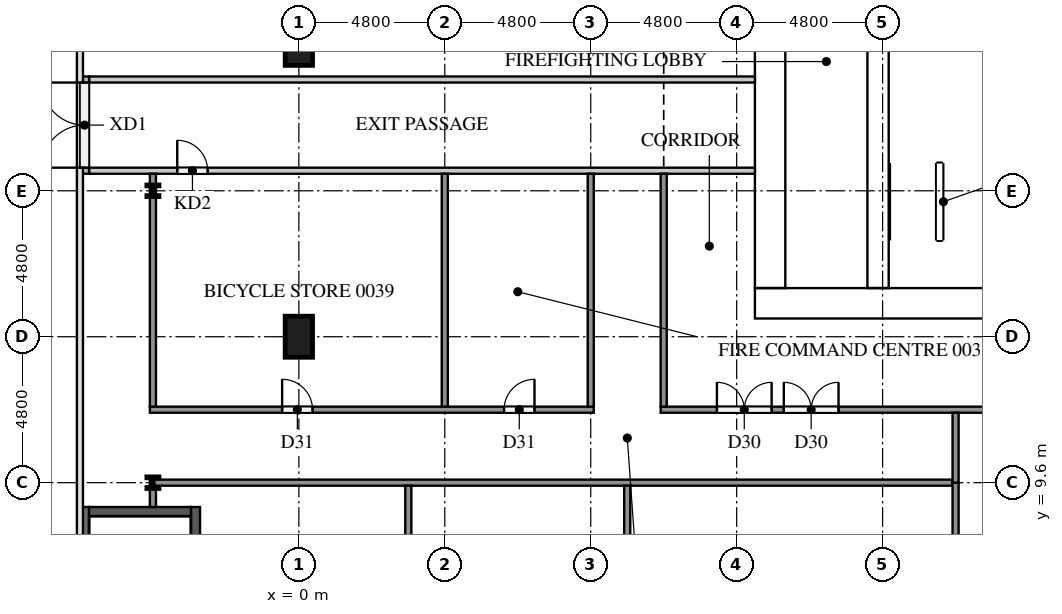
"""IFC4 building model, lengths in metres.
Left out: names, types, materials, properties, quantities, classifications, styles, units other than length and angle.
Written with IfcOpenShell. Run it as: python <this file> out.ifc"""

import sys

from ifc_helpers import new_model, si_unit, direction, frame, frame_2d, origin, origin_2d, place, context, subcontext, project, spatial, rectangle, i_section, extrude, element, fill, save


model = new_model("IFC4")
c1 = context("Model", 3, precision=1e-05, world=origin(), true_north=direction((0.0, 1.0)))
c2 = subcontext(c1, "Body", "Model", "MODEL_VIEW")
j1 = project(units=[si_unit("LENGTHUNIT", "METRE"), si_unit("PLANEANGLEUNIT", "RADIAN")], contexts=[c1])
p1 = place(None, origin())
s1 = spatial("IfcSite", under=j1, at=p1, CompositionType="ELEMENT")
p2 = place(p1, origin())
s2 = spatial("IfcBuilding", under=s1, at=p2, CompositionType="ELEMENT")
p3 = place(p2, origin())
s3 = spatial("IfcBuildingStorey", under=s2, at=p3, CompositionType="ELEMENT", Elevation=0.0)
p4 = place(p3, frame((-7.05, 0.8, 0.0), z_axis=(0.0, 0.0, 1.0), x_axis=(0.0, 1.0, 0.0)))
e1 = element("IfcWall", 1, at=p4, inside=s3, PredefinedType="SOLIDWALL", context=c2, shape_type="SweptSolid", body=[
    extrude(rectangle(XDim=8.0, YDim=0.3, at=frame_2d((4.0, 0.0))), origin(), (0.0, 0.0, 1.0), 5.7),
])
p5 = place(p4, frame((0.4, 0.0, 0.0)))
e2 = element("IfcOpeningElement", 2, at=p5, cuts=e1, PredefinedType="OPENING", context=c2, shape_type="SweptSolid", body=[
    extrude(rectangle(XDim=1.4, YDim=2.1, at=frame_2d((0.7, 1.05))), frame((0.0, 0.16, 0.0), z_axis=(0.0, -1.0, 0.0), x_axis=(1.0, 0.0, 0.0)), (0.0, 0.0, 1.0), 0.32),
])
p6 = place(p3, frame((-3.4, 0.8, 0.0), z_axis=(0.0, 0.0, 1.0), x_axis=(0.0, 1.0, 0.0)))
e3 = element("IfcWall", 3, at=p6, inside=s3, PredefinedType="SOLIDWALL", context=c2, shape_type="SweptSolid", body=[
    extrude(rectangle(XDim=8.0, YDim=0.3, at=frame_2d((4.0, 0.0))), origin(), (0.0, 0.0, 1.0), 5.7),
])
p7 = place(p3, frame((-6.9, 8.65, 0.0), z_axis=(0.0, 0.0, 1.0), x_axis=(1.0, 0.0, 0.0)))
e4 = element("IfcWall", 4, at=p7, inside=s3, PredefinedType="SOLIDWALL", context=c2, shape_type="SweptSolid", body=[
    extrude(rectangle(XDim=3.35, YDim=0.3, at=frame_2d((1.675, 0.0))), origin(), (0.0, 0.0, 1.0), 5.7),
])
p8 = place(p3, frame((15.0, 15.5, 0.0), z_axis=(0.0, 0.0, 1.0), x_axis=(1.0, 0.0, 0.0)))
e5 = element("IfcWall", 5, at=p8, inside=s3, PredefinedType="SHEAR", context=c2, shape_type="SweptSolid", body=[
    extrude(rectangle(XDim=32.4, YDim=1.0, at=frame_2d((16.2, 0.0))), origin(), (0.0, 0.0, 1.0), 5.7),
])
p9 = place(p8, frame((15.3, 0.0, 0.0)))
e6 = element("IfcOpeningElement", 6, at=p9, cuts=e5, PredefinedType="OPENING", context=c2, shape_type="SweptSolid", body=[
    extrude(rectangle(XDim=1.8, YDim=2.1, at=frame_2d((0.9, 1.05))), frame((0.0, 0.51, 0.0), z_axis=(0.0, -1.0, 0.0), x_axis=(1.0, 0.0, 0.0)), (0.0, 0.0, 1.0), 1.02),
])
p10 = place(p3, frame((15.5, 16.0, 0.0), z_axis=(0.0, 0.0, 1.0), x_axis=(0.0, 1.0, 0.0)))
e7 = element("IfcWall", 7, at=p10, inside=s3, PredefinedType="SHEAR", context=c2, shape_type="SweptSolid", body=[
    extrude(rectangle(XDim=20.8, YDim=1.0, at=frame_2d((10.4, 0.0))), origin(), (0.0, 0.0, 1.0), 5.7),
])
p11 = place(p10, frame((4.76, 0.0, 0.0)))
e8 = element("IfcOpeningElement", 8, at=p11, cuts=e7, PredefinedType="OPENING", context=c2, shape_type="SweptSolid", body=[
    extrude(rectangle(XDim=1.2, YDim=2.1, at=frame_2d((0.6, 1.05))), frame((0.0, 0.51, 0.0), z_axis=(0.0, -1.0, 0.0), x_axis=(1.0, 0.0, 0.0)), (0.0, 0.0, 1.0), 1.02),
])
p12 = place(p3, frame((19.05, 16.0, 0.0), z_axis=(0.0, 0.0, 1.0), x_axis=(0.0, 1.0, 0.0)))
e9 = element("IfcWall", 9, at=p12, inside=s3, PredefinedType="SHEAR", context=c2, shape_type="SweptSolid", body=[
    extrude(rectangle(XDim=14.9, YDim=0.7, at=frame_2d((7.45, 0.0))), origin(), (0.0, 0.0, 1.0), 5.7),
])
p13 = place(p12, frame((9.45, 0.0, 0.0)))
e10 = element("IfcOpeningElement", 10, at=p13, cuts=e9, PredefinedType="OPENING", context=c2, shape_type="SweptSolid", body=[
    extrude(rectangle(XDim=1.1, YDim=2.1, at=frame_2d((0.55, 1.05))), frame((0.0, 0.36, 0.0), z_axis=(0.0, -1.0, 0.0), x_axis=(1.0, 0.0, 0.0)), (0.0, 0.0, 1.0), 0.72),
])
p14 = place(p12, frame((12.95, 0.0, 0.0)))
e11 = element("IfcOpeningElement", 11, at=p14, cuts=e9, PredefinedType="OPENING", context=c2, shape_type="SweptSolid", body=[
    extrude(rectangle(XDim=1.1, YDim=2.1, at=frame_2d((0.55, 1.05))), frame((0.0, 0.36, 0.0), z_axis=(0.0, -1.0, 0.0), x_axis=(1.0, 0.0, 0.0)), (0.0, 0.0, 1.0), 0.72),
])
p15 = place(p12, frame((0.2, 0.0, 0.0)))
e12 = element("IfcOpeningElement", 12, at=p15, cuts=e9, PredefinedType="OPENING", context=c2, shape_type="SweptSolid", body=[
    extrude(rectangle(XDim=1.2, YDim=2.1, at=frame_2d((0.6, 1.05))), frame((0.0, 0.36, 0.0), z_axis=(0.0, -1.0, 0.0), x_axis=(1.0, 0.0, 0.0)), (0.0, 0.0, 1.0), 0.72),
])
for number, where, z_axis, x_axis in (
    (13, (0.0, 24.0, 0.0), (0.0, 0.0, 1.0), (0.0, 1.0, 0.0)),
    (14, (0.0, 14.4, 0.0), (0.0, 0.0, 1.0), (0.0, 1.0, 0.0)),
):
    element("IfcColumn", number, at=place(p3, frame(where, z_axis=z_axis, x_axis=x_axis)), inside=s3, PredefinedType="COLUMN", context=c2, shape_type="SweptSolid", body=[
        extrude(rectangle(XDim=1.35, YDim=0.9, at=origin_2d()), origin(), (0.0, 0.0, 1.0), 5.7),
    ])
for number, where, z_axis, x_axis in (
    (15, (-4.8, 9.6, 0.0), (0.0, 0.0, 1.0), (1.0, 0.0, 0.0)),
    (16, (-4.8, 19.2, 0.0), (0.0, 0.0, 1.0), (1.0, 0.0, 0.0)),
):
    element("IfcColumn", number, at=place(p3, frame(where, z_axis=z_axis, x_axis=x_axis)), inside=s3, PredefinedType="COLUMN", context=c2, shape_type="SweptSolid", body=[
        extrude(i_section(OverallWidth=0.396, OverallDepth=0.381, WebThickness=0.019, FlangeThickness=0.03, at=origin_2d()), origin(), (0.0, 0.0, 1.0), 5.7),
    ])
p16 = place(p3, frame((-6.9, 19.86, 0.0), z_axis=(0.0, 0.0, 1.0), x_axis=(1.0, 0.0, 0.0)))
e17 = element("IfcWall", 17, at=p16, inside=s3, PredefinedType="PARTITIONING", context=c2, shape_type="SweptSolid", body=[
    extrude(rectangle(XDim=21.9, YDim=0.2, at=frame_2d((10.95, 0.0))), origin(), (0.0, 0.0, 1.0), 5.7),
])
p17 = place(p16, frame((2.9, 0.0, 0.0)))
e18 = element("IfcOpeningElement", 18, at=p17, cuts=e17, PredefinedType="OPENING", context=c2, shape_type="SweptSolid", body=[
    extrude(rectangle(XDim=1.0, YDim=2.1, at=frame_2d((0.5, 1.05))), frame((0.0, 0.11, 0.0), z_axis=(0.0, -1.0, 0.0), x_axis=(1.0, 0.0, 0.0)), (0.0, 0.0, 1.0), 0.22),
])
p18 = place(p3, frame((-6.9, 22.86, 0.0), z_axis=(0.0, 0.0, 1.0), x_axis=(1.0, 0.0, 0.0)))
e19 = element("IfcWall", 19, at=p18, inside=s3, PredefinedType="PARTITIONING", context=c2, shape_type="SweptSolid", body=[
    extrude(rectangle(XDim=21.9, YDim=0.2, at=frame_2d((10.95, 0.0))), origin(), (0.0, 0.0, 1.0), 5.7),
])
p19 = place(p3, frame((-7.05, 19.76, 0.0), z_axis=(0.0, 0.0, 1.0), x_axis=(0.0, 1.0, 0.0)))
e20 = element("IfcWall", 20, at=p19, inside=s3, PredefinedType="SOLIDWALL", context=c2, shape_type="SweptSolid", body=[
    extrude(rectangle(XDim=3.2, YDim=0.3, at=frame_2d((1.6, 0.0))), origin(), (0.0, 0.0, 1.0), 5.7),
])
p20 = place(p19, frame((0.2, 0.0, 0.0)))
e21 = element("IfcOpeningElement", 21, at=p20, cuts=e20, PredefinedType="OPENING", context=c2, shape_type="SweptSolid", body=[
    extrude(rectangle(XDim=2.8, YDim=2.1, at=frame_2d((1.4, 1.05))), frame((0.0, 0.16, 0.0), z_axis=(0.0, -1.0, 0.0), x_axis=(1.0, 0.0, 0.0)), (0.0, 0.0, 1.0), 0.32),
])
p21 = place(p3, frame((-4.9, 9.6, 0.0), z_axis=(0.0, 0.0, 1.0), x_axis=(1.0, 0.0, 0.0)))
e22 = element("IfcWall", 22, at=p21, inside=s3, PredefinedType="PARTITIONING", context=c2, shape_type="SweptSolid", body=[
    extrude(rectangle(XDim=26.4, YDim=0.2, at=frame_2d((13.2, 0.0))), origin(), (0.0, 0.0, 1.0), 5.7),
])
p22 = place(p3, frame((-4.9, 12.0, 0.0), z_axis=(0.0, 0.0, 1.0), x_axis=(1.0, 0.0, 0.0)))
e23 = element("IfcWall", 23, at=p22, inside=s3, PredefinedType="PARTITIONING", context=c2, shape_type="SweptSolid", body=[
    extrude(rectangle(XDim=14.6, YDim=0.2, at=frame_2d((7.3, 0.0))), origin(), (0.0, 0.0, 1.0), 5.7),
])
p23 = place(p22, frame((11.65, 0.0, 0.0)))
e24 = element("IfcOpeningElement", 24, at=p23, cuts=e23, PredefinedType="OPENING", context=c2, shape_type="SweptSolid", body=[
    extrude(rectangle(XDim=1.0, YDim=2.1, at=frame_2d((0.5, 1.05))), frame((0.0, 0.11, 0.0), z_axis=(0.0, -1.0, 0.0), x_axis=(1.0, 0.0, 0.0)), (0.0, 0.0, 1.0), 0.22),
])
p24 = place(p22, frame((4.35, 0.0, 0.0)))
e25 = element("IfcOpeningElement", 25, at=p24, cuts=e23, PredefinedType="OPENING", context=c2, shape_type="SweptSolid", body=[
    extrude(rectangle(XDim=1.0, YDim=2.1, at=frame_2d((0.5, 1.05))), frame((0.0, 0.11, 0.0), z_axis=(0.0, -1.0, 0.0), x_axis=(1.0, 0.0, 0.0)), (0.0, 0.0, 1.0), 0.22),
])
p25 = place(p3, frame((11.9, 12.0, 0.0), z_axis=(0.0, 0.0, 1.0), x_axis=(1.0, 0.0, 0.0)))
e26 = element("IfcWall", 26, at=p25, inside=s3, PredefinedType="PARTITIONING", context=c2, shape_type="SweptSolid", body=[
    extrude(rectangle(XDim=38.6, YDim=0.2, at=frame_2d((19.3, 0.0))), origin(), (0.0, 0.0, 1.0), 5.7),
])
p26 = place(p25, frame((1.85, 0.0, 0.0)))
e27 = element("IfcOpeningElement", 27, at=p26, cuts=e26, PredefinedType="OPENING", context=c2, shape_type="SweptSolid", body=[
    extrude(rectangle(XDim=1.8, YDim=2.1, at=frame_2d((0.9, 1.05))), frame((0.0, 0.11, 0.0), z_axis=(0.0, -1.0, 0.0), x_axis=(1.0, 0.0, 0.0)), (0.0, 0.0, 1.0), 0.22),
])
p27 = place(p25, frame((23.25, 0.0, 0.0)))
e28 = element("IfcOpeningElement", 28, at=p27, cuts=e26, PredefinedType="OPENING", context=c2, shape_type="SweptSolid", body=[
    extrude(rectangle(XDim=1.8, YDim=2.1, at=frame_2d((0.9, 1.05))), frame((0.0, 0.11, 0.0), z_axis=(0.0, -1.0, 0.0), x_axis=(1.0, 0.0, 0.0)), (0.0, 0.0, 1.0), 0.22),
])
p28 = place(p25, frame((13.65, 0.0, 0.0)))
e29 = element("IfcOpeningElement", 29, at=p28, cuts=e26, PredefinedType="OPENING", context=c2, shape_type="SweptSolid", body=[
    extrude(rectangle(XDim=1.8, YDim=2.1, at=frame_2d((0.9, 1.05))), frame((0.0, 0.11, 0.0), z_axis=(0.0, -1.0, 0.0), x_axis=(1.0, 0.0, 0.0)), (0.0, 0.0, 1.0), 0.22),
])
p29 = place(p25, frame((4.05, 0.0, 0.0)))
e30 = element("IfcOpeningElement", 30, at=p29, cuts=e26, PredefinedType="OPENING", context=c2, shape_type="SweptSolid", body=[
    extrude(rectangle(XDim=1.8, YDim=2.1, at=frame_2d((0.9, 1.05))), frame((0.0, 0.11, 0.0), z_axis=(0.0, -1.0, 0.0), x_axis=(1.0, 0.0, 0.0)), (0.0, 0.0, 1.0), 0.22),
])
p30 = place(p3, frame((-4.8, 8.8, 0.0), z_axis=(0.0, 0.0, 1.0), x_axis=(0.0, 1.0, 0.0)))
e31 = element("IfcWall", 31, at=p30, inside=s3, PredefinedType="PARTITIONING", context=c2, shape_type="SweptSolid", body=[
    extrude(rectangle(XDim=0.7, YDim=0.2, at=frame_2d((0.35, 0.0))), origin(), (0.0, 0.0, 1.0), 5.7),
])
p31 = place(p3, frame((-4.8, 12.1, 0.0), z_axis=(0.0, 0.0, 1.0), x_axis=(0.0, 1.0, 0.0)))
e32 = element("IfcWall", 32, at=p31, inside=s3, PredefinedType="PARTITIONING", context=c2, shape_type="SweptSolid", body=[
    extrude(rectangle(XDim=7.66, YDim=0.2, at=frame_2d((3.83, 0.0))), origin(), (0.0, 0.0, 1.0), 5.7),
])
p32 = place(p3, frame((3.6, 0.1, 0.0), z_axis=(0.0, 0.0, 1.0), x_axis=(0.0, 1.0, 0.0)))
e33 = element("IfcWall", 33, at=p32, inside=s3, PredefinedType="PARTITIONING", context=c2, shape_type="SweptSolid", body=[
    extrude(rectangle(XDim=9.4, YDim=0.2, at=frame_2d((4.7, 0.0))), origin(), (0.0, 0.0, 1.0), 5.7),
])
for number, where, z_axis, x_axis in (
    (34, (4.8, 12.1, 0.0), (0.0, 0.0, 1.0), (0.0, 1.0, 0.0)),
    (35, (9.6, 12.1, 0.0), (0.0, 0.0, 1.0), (0.0, 1.0, 0.0)),
):
    element("IfcWall", number, at=place(p3, frame(where, z_axis=z_axis, x_axis=x_axis)), inside=s3, PredefinedType="PARTITIONING", context=c2, shape_type="SweptSolid", body=[
        extrude(rectangle(XDim=7.66, YDim=0.2, at=frame_2d((3.83, 0.0))), origin(), (0.0, 0.0, 1.0), 5.7),
    ])
p33 = place(p3, frame((10.8, 0.1, 0.0), z_axis=(0.0, 0.0, 1.0), x_axis=(0.0, 1.0, 0.0)))
e36 = element("IfcWall", 36, at=p33, inside=s3, PredefinedType="PARTITIONING", context=c2, shape_type="SweptSolid", body=[
    extrude(rectangle(XDim=9.4, YDim=0.2, at=frame_2d((4.7, 0.0))), origin(), (0.0, 0.0, 1.0), 5.7),
])
p34 = place(p3, frame((12.0, 12.1, 0.0), z_axis=(0.0, 0.0, 1.0), x_axis=(0.0, 1.0, 0.0)))
e37 = element("IfcWall", 37, at=p34, inside=s3, PredefinedType="PARTITIONING", context=c2, shape_type="SweptSolid", body=[
    extrude(rectangle(XDim=7.66, YDim=0.2, at=frame_2d((3.83, 0.0))), origin(), (0.0, 0.0, 1.0), 5.7),
])
p35 = place(p3, frame((21.6, 0.0, 0.0), z_axis=(0.0, 0.0, 1.0), x_axis=(0.0, 1.0, 0.0)))
e38 = element("IfcWall", 38, at=p35, inside=s3, PredefinedType="PARTITIONING", context=c2, shape_type="SweptSolid", body=[
    extrude(rectangle(XDim=9.6, YDim=0.2, at=frame_2d((4.8, 0.0))), origin(), (0.0, 0.0, 1.0), 5.7),
])
p36 = place(p3, frame((21.6, 9.6, 0.0), z_axis=(0.0, 0.0, 1.0), x_axis=(0.0, 1.0, 0.0)))
e39 = element("IfcWall", 39, at=p36, inside=s3, PredefinedType="PARTITIONING", context=c2, shape_type="SweptSolid", body=[
    extrude(rectangle(XDim=2.3, YDim=0.2, at=frame_2d((1.15, 0.0))), origin(), (0.0, 0.0, 1.0), 5.7),
])
p37 = place(p15, origin())
e40 = element("IfcDoor", 40, at=p37, inside=s3, OperationType="SINGLE_SWING_RIGHT", PredefinedType="DOOR", context=c2, shape_type="SweptSolid", body=[
    extrude(rectangle(XDim=1.2, YDim=2.1, at=frame_2d((0.6, 1.05))), frame((0.0, 0.025, 0.0), z_axis=(0.0, -1.0, 0.0), x_axis=(1.0, 0.0, 0.0)), (0.0, 0.0, 1.0), 0.05),
])
fill(e12, e40)
p38 = place(p11, origin())
e41 = element("IfcDoor", 41, at=p38, inside=s3, OperationType="SINGLE_SWING_LEFT", PredefinedType="DOOR", context=c2, shape_type="SweptSolid", body=[
    extrude(rectangle(XDim=1.2, YDim=2.1, at=frame_2d((0.6, 1.05))), frame((0.0, 0.025, 0.0), z_axis=(0.0, -1.0, 0.0), x_axis=(1.0, 0.0, 0.0)), (0.0, 0.0, 1.0), 0.05),
])
fill(e8, e41)
p39 = place(p17, origin())
e42 = element("IfcDoor", 42, at=p39, inside=s3, OperationType="SINGLE_SWING_LEFT", PredefinedType="DOOR", context=c2, shape_type="SweptSolid", body=[
    extrude(rectangle(XDim=1.0, YDim=2.1, at=frame_2d((0.5, 1.05))), frame((0.0, 0.025, 0.0), z_axis=(0.0, -1.0, 0.0), x_axis=(1.0, 0.0, 0.0)), (0.0, 0.0, 1.0), 0.05),
])
fill(e18, e42)
p40 = place(p20, origin())
e43 = element("IfcDoor", 43, at=p40, inside=s3, OperationType="DOUBLE_DOOR_SINGLE_SWING", PredefinedType="DOOR", context=c2, shape_type="SweptSolid", body=[
    extrude(rectangle(XDim=2.8, YDim=2.1, at=frame_2d((1.4, 1.05))), frame((0.0, 0.025, 0.0), z_axis=(0.0, -1.0, 0.0), x_axis=(1.0, 0.0, 0.0)), (0.0, 0.0, 1.0), 0.05),
])
fill(e21, e43)
p41 = place(p26, origin())
e44 = element("IfcDoor", 44, at=p41, inside=s3, OperationType="DOUBLE_DOOR_SINGLE_SWING", PredefinedType="DOOR", context=c2, shape_type="SweptSolid", body=[
    extrude(rectangle(XDim=1.8, YDim=2.1, at=frame_2d((0.9, 1.05))), frame((0.0, 0.025, 0.0), z_axis=(0.0, -1.0, 0.0), x_axis=(1.0, 0.0, 0.0)), (0.0, 0.0, 1.0), 0.05),
])
fill(e27, e44)
p42 = place(p23, origin())
e45 = element("IfcDoor", 45, at=p42, inside=s3, OperationType="SINGLE_SWING_RIGHT", PredefinedType="DOOR", context=c2, shape_type="SweptSolid", body=[
    extrude(rectangle(XDim=1.0, YDim=2.1, at=frame_2d((0.5, 1.05))), frame((0.0, 0.025, 0.0), z_axis=(0.0, -1.0, 0.0), x_axis=(1.0, 0.0, 0.0)), (0.0, 0.0, 1.0), 0.05),
])
fill(e24, e45)
p43 = place(p24, origin())
e46 = element("IfcDoor", 46, at=p43, inside=s3, OperationType="SINGLE_SWING_LEFT", PredefinedType="DOOR", context=c2, shape_type="SweptSolid", body=[
    extrude(rectangle(XDim=1.0, YDim=2.1, at=frame_2d((0.5, 1.05))), frame((0.0, 0.025, 0.0), z_axis=(0.0, -1.0, 0.0), x_axis=(1.0, 0.0, 0.0)), (0.0, 0.0, 1.0), 0.05),
])
fill(e25, e46)
p44 = place(p29, origin())
e47 = element("IfcDoor", 47, at=p44, inside=s3, OperationType="DOUBLE_DOOR_SINGLE_SWING", PredefinedType="DOOR", context=c2, shape_type="SweptSolid", body=[
    extrude(rectangle(XDim=1.8, YDim=2.1, at=frame_2d((0.9, 1.05))), frame((0.0, 0.025, 0.0), z_axis=(0.0, -1.0, 0.0), x_axis=(1.0, 0.0, 0.0)), (0.0, 0.0, 1.0), 0.05),
])
fill(e30, e47)
save(model, sys.argv[1])
